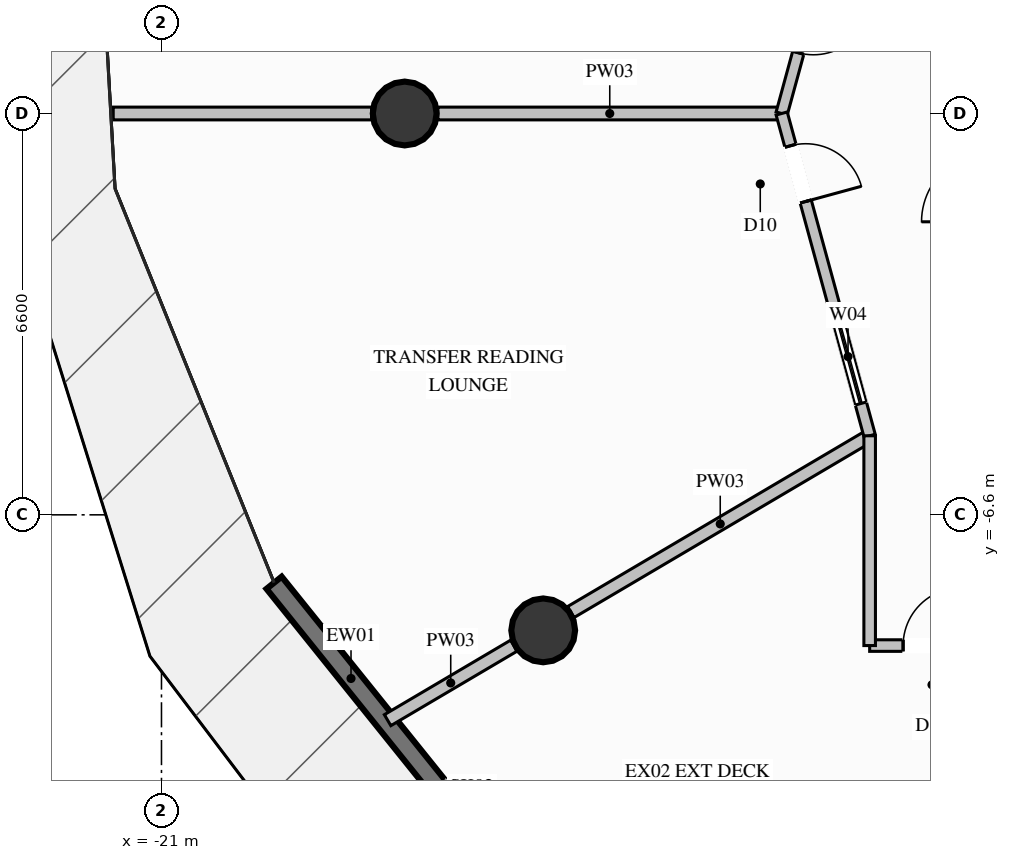
"""IFC4 building model, lengths in metres.
Left out: names, types, materials, properties, quantities, classifications, styles, units other than length and angle.
Written with IfcOpenShell. Run it as: python <this file> out.ifc"""

import sys

from ifc_helpers import new_model, si_unit, direction, frame, frame_2d, origin, origin_2d, place, context, subcontext, project, spatial, rectangle, circle, extrude, element, fill, save


model = new_model("IFC4")
c1 = context("Model", 3, precision=1e-05, world=origin(), true_north=direction((0.0, 1.0)))
c2 = subcontext(c1, "Body", "Model", "MODEL_VIEW")
j1 = project(units=[si_unit("LENGTHUNIT", "METRE"), si_unit("PLANEANGLEUNIT", "RADIAN")], contexts=[c1])
p1 = place(None, origin())
s1 = spatial("IfcSite", under=j1, at=p1, CompositionType="ELEMENT")
p2 = place(p1, origin())
s2 = spatial("IfcBuilding", under=s1, at=p2, CompositionType="ELEMENT")
p3 = place(p2, frame((0.0, 0.0, 98.0)))
s3 = spatial("IfcBuildingStorey", under=s2, at=p3, CompositionType="ELEMENT", Elevation=98.0)
for number, where, z_axis, x_axis in (
    (1, (-17.0, 0.0, 0.0), (0.0, 0.0, 1.0), (1.0, 0.0, 0.0)),
    (2, (-14.722, -8.5, 0.0), (0.0, 0.0, 1.0), (1.0, 0.0, 0.0)),
):
    element("IfcColumn", number, at=place(p3, frame(where, z_axis=z_axis, x_axis=x_axis)), inside=s3, PredefinedType="COLUMN", context=c2, shape_type="SweptSolid", body=[
        extrude(circle(Radius=0.525, at=origin_2d()), origin(), (0.0, 0.0, 1.0), 4.6),
    ])
p4 = place(p3, frame((-14.546, -13.443, 0.0), z_axis=(0.0, 0.0, 1.0), x_axis=(-0.626452409109, 0.77945967126, 0.0)))
e3 = element("IfcWall", 3, at=p4, inside=s3, PredefinedType="SOLIDWALL", context=c2, shape_type="SweptSolid", body=[
    extrude(rectangle(XDim=7.346, YDim=0.32, at=frame_2d((3.673, 0.0))), origin(), (0.0, 0.0, 1.0), 4.35),
])
p5 = place(p4, frame((1.257, 0.0, 0.6)))
e4 = element("IfcOpeningElement", 4, at=p5, cuts=e3, PredefinedType="OPENING", context=c2, shape_type="SweptSolid", body=[
    extrude(rectangle(XDim=1.8, YDim=2.2, at=frame_2d((0.9, 1.1))), frame((0.0, 0.17, 0.0), z_axis=(0.0, -1.0, 0.0), x_axis=(1.0, 0.0, 0.0)), (0.0, 0.0, 1.0), 0.34),
])
p6 = place(p3, frame((-10.8, 0.0, 0.0), z_axis=(0.0, 0.0, 1.0), x_axis=(-1.0, 0.0, 0.0)))
e5 = element("IfcWall", 5, at=p6, inside=s3, PredefinedType="PARTITIONING", context=c2, shape_type="SweptSolid", body=[
    extrude(rectangle(XDim=5.655, YDim=0.21, at=frame_2d((2.828, 0.0))), origin(), (0.0, 0.0, 1.0), 4.35),
])
p7 = place(p3, frame((-17.545, 0.0, 0.0), z_axis=(0.0, 0.0, 1.0), x_axis=(-1.0, 0.0, 0.0)))
e6 = element("IfcWall", 6, at=p7, inside=s3, PredefinedType="PARTITIONING", context=c2, shape_type="SweptSolid", body=[
    extrude(rectangle(XDim=4.249, YDim=0.21, at=frame_2d((2.125, 0.0))), origin(), (0.0, 0.0, 1.0), 4.35),
])
p8 = place(p3, frame((-9.353, -5.3, 0.0), z_axis=(0.0, 0.0, 1.0), x_axis=(-0.86134190124, -0.508025717034, 0.0)))
e7 = element("IfcWall", 7, at=p8, inside=s3, PredefinedType="PARTITIONING", context=c2, shape_type="SweptSolid", body=[
    extrude(rectangle(XDim=5.706, YDim=0.21, at=frame_2d((2.853, 0.0))), origin(), (0.0, 0.0, 1.0), 3.718),
])
p9 = place(p3, frame((-15.205, -8.752, 0.0), z_axis=(0.0, 0.0, 1.0), x_axis=(-0.861214730318, -0.508241269756, 0.0)))
e8 = element("IfcWall", 8, at=p9, inside=s3, PredefinedType="PARTITIONING", context=c2, shape_type="SweptSolid", body=[
    extrude(rectangle(XDim=2.41, YDim=0.21, at=frame_2d((1.205, 0.0))), origin(), (0.0, 0.0, 1.0), 4.35),
])
p10 = place(p3, frame((-10.004, 2.915, 0.0), z_axis=(0.0, 0.0, 1.0), x_axis=(-0.26346604157, -0.964668671068, 0.0)))
e9 = element("IfcWall", 9, at=p10, inside=s3, PredefinedType="PARTITIONING", context=c2, shape_type="SweptSolid", body=[
    extrude(rectangle(XDim=3.022, YDim=0.19, at=frame_2d((1.511, 0.0))), origin(), (0.0, 0.0, 1.0), 4.35),
])
p11 = place(p10, frame((1.036, 0.0, 0.0)))
e10 = element("IfcOpeningElement", 10, at=p11, cuts=e9, PredefinedType="OPENING", context=c2, shape_type="SweptSolid", body=[
    extrude(rectangle(XDim=0.95, YDim=2.1, at=frame_2d((0.475, 1.05))), frame((0.0, 0.105, 0.0), z_axis=(0.0, -1.0, 0.0), x_axis=(1.0, 0.0, 0.0)), (0.0, 0.0, 1.0), 0.21),
])
p12 = place(p3, frame((-10.8, 0.0, 0.0), z_axis=(0.0, 0.0, 1.0), x_axis=(0.263380602271, -0.964692001805, 0.0)))
e11 = element("IfcWall", 11, at=p12, inside=s3, PredefinedType="PARTITIONING", context=c2, shape_type="SweptSolid", body=[
    extrude(rectangle(XDim=5.494, YDim=0.19, at=frame_2d((2.747, 0.0))), origin(), (0.0, 0.0, 1.0), 4.35),
])
p13 = place(p12, frame((0.55, 0.0, 0.0)))
e12 = element("IfcOpeningElement", 12, at=p13, cuts=e11, PredefinedType="OPENING", context=c2, shape_type="SweptSolid", body=[
    extrude(rectangle(XDim=0.95, YDim=2.1, at=frame_2d((0.475, 1.05))), frame((0.0, 0.105, 0.0), z_axis=(0.0, -1.0, 0.0), x_axis=(1.0, 0.0, 0.0)), (0.0, 0.0, 1.0), 0.21),
])
p14 = place(p12, frame((3.344, 0.0, 0.9)))
e13 = element("IfcOpeningElement", 13, at=p14, cuts=e11, PredefinedType="OPENING", context=c2, shape_type="SweptSolid", body=[
    extrude(rectangle(XDim=1.6, YDim=1.4, at=frame_2d((0.8, 0.7))), frame((0.0, 0.105, 0.0), z_axis=(0.0, -1.0, 0.0), x_axis=(1.0, 0.0, 0.0)), (0.0, 0.0, 1.0), 0.21),
])
p15 = place(p3, frame((-9.353, -8.75, 0.0), z_axis=(0.0, 0.0, 1.0), x_axis=(1.0, 0.0, 0.0)))
e14 = element("IfcWall", 14, at=p15, inside=s3, PredefinedType="PARTITIONING", context=c2, shape_type="SweptSolid", body=[
    extrude(rectangle(XDim=9.353, YDim=0.19, at=frame_2d((4.677, 0.0))), origin(), (0.0, 0.0, 1.0), 4.35),
])
p16 = place(p15, frame((0.55, 0.0, 0.0)))
e15 = element("IfcOpeningElement", 15, at=p16, cuts=e14, PredefinedType="OPENING", context=c2, shape_type="SweptSolid", body=[
    extrude(rectangle(XDim=0.95, YDim=2.1, at=frame_2d((0.475, 1.05))), frame((0.0, 0.105, 0.0), z_axis=(0.0, -1.0, 0.0), x_axis=(1.0, 0.0, 0.0)), (0.0, 0.0, 1.0), 0.21),
])
p17 = place(p15, frame((7.203, 0.0, 0.9)))
e16 = element("IfcOpeningElement", 16, at=p17, cuts=e14, PredefinedType="OPENING", context=c2, shape_type="SweptSolid", body=[
    extrude(rectangle(XDim=1.6, YDim=1.4, at=frame_2d((0.8, 0.7))), frame((0.0, 0.105, 0.0), z_axis=(0.0, -1.0, 0.0), x_axis=(1.0, 0.0, 0.0)), (0.0, 0.0, 1.0), 0.21),
])
p18 = place(p3, frame((-9.353, -5.3, 0.0), z_axis=(0.0, 0.0, 1.0), x_axis=(0.0, -1.0, 0.0)))
e17 = element("IfcWall", 17, at=p18, inside=s3, PredefinedType="PARTITIONING", context=c2, shape_type="SweptSolid", body=[
    extrude(rectangle(XDim=3.45, YDim=0.19, at=frame_2d((1.725, 0.0))), origin(), (0.0, 0.0, 1.0), 4.35),
])
p19 = place(p11, origin())
e18 = element("IfcDoor", 18, at=p19, inside=s3, OperationType="SINGLE_SWING_LEFT", PredefinedType="DOOR", context=c2, shape_type="SweptSolid", body=[
    extrude(rectangle(XDim=0.95, YDim=2.1, at=frame_2d((0.475, 1.05))), frame((0.0, 0.025, 0.0), z_axis=(0.0, -1.0, 0.0), x_axis=(1.0, 0.0, 0.0)), (0.0, 0.0, 1.0), 0.05),
])
fill(e10, e18)
p20 = place(p13, origin())
e19 = element("IfcDoor", 19, at=p20, inside=s3, OperationType="SINGLE_SWING_RIGHT", PredefinedType="DOOR", context=c2, shape_type="SweptSolid", body=[
    extrude(rectangle(XDim=0.95, YDim=2.1, at=frame_2d((0.475, 1.05))), frame((0.0, 0.025, 0.0), z_axis=(0.0, -1.0, 0.0), x_axis=(1.0, 0.0, 0.0)), (0.0, 0.0, 1.0), 0.05),
])
fill(e12, e19)
p21 = place(p14, origin())
e20 = element("IfcWindow", 20, at=p21, inside=s3, PartitioningType="SINGLE_PANEL", PredefinedType="WINDOW", context=c2, shape_type="SweptSolid", body=[
    extrude(rectangle(XDim=1.6, YDim=1.4, at=frame_2d((0.8, 0.7))), frame((0.0, 0.03, 0.0), z_axis=(0.0, -1.0, 0.0), x_axis=(1.0, 0.0, 0.0)), (0.0, 0.0, 1.0), 0.06),
])
fill(e13, e20)
p22 = place(p16, origin())
e21 = element("IfcDoor", 21, at=p22, inside=s3, OperationType="SINGLE_SWING_RIGHT", PredefinedType="DOOR", context=c2, shape_type="SweptSolid", body=[
    extrude(rectangle(XDim=0.95, YDim=2.1, at=frame_2d((0.475, 1.05))), frame((0.0, 0.025, 0.0), z_axis=(0.0, -1.0, 0.0), x_axis=(1.0, 0.0, 0.0)), (0.0, 0.0, 1.0), 0.05),
])
fill(e15, e21)
save(model, sys.argv[1])
